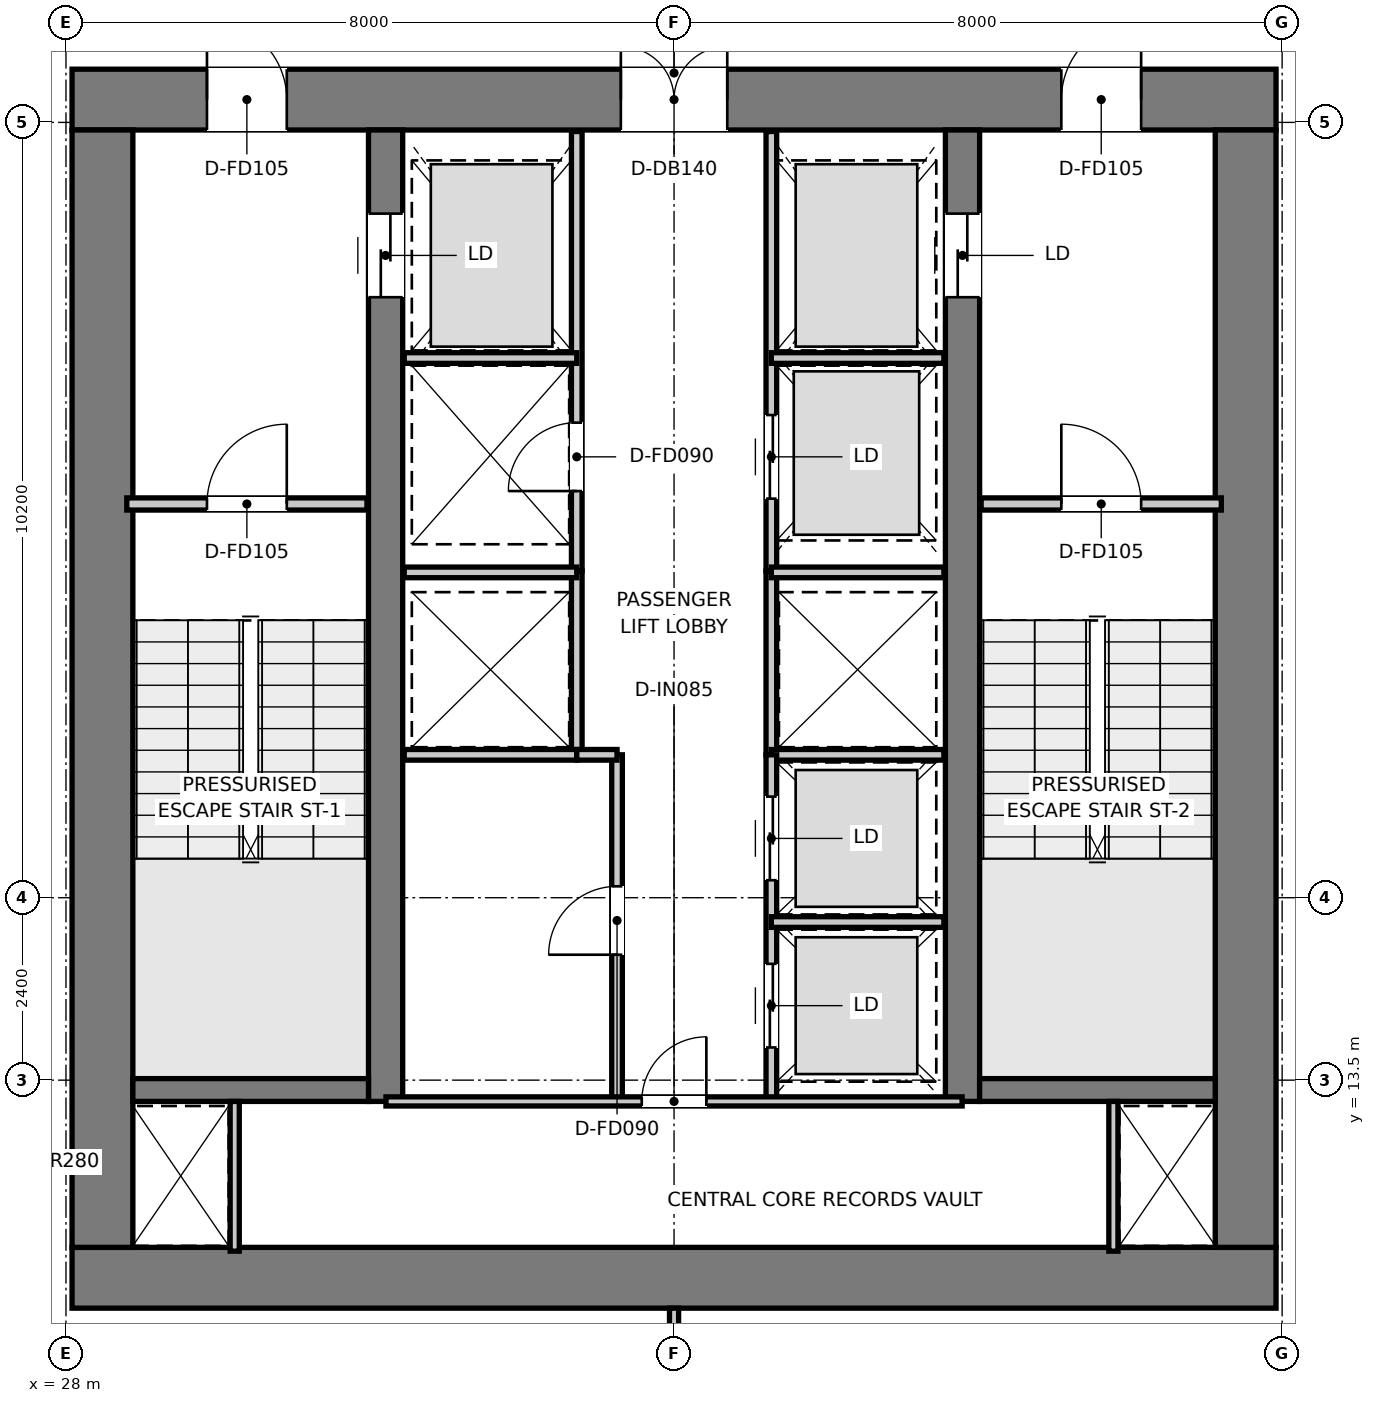
"""IFC4 building model, lengths in metres.
Left out: names, types, materials, properties, quantities, classifications, styles, units other than length and angle.
Written with IfcOpenShell. Run it as: python <this file> out.ifc"""

import sys

from ifc_helpers import new_model, si_unit, direction, frame, frame_2d, origin, place, context, subcontext, project, spatial, rectangle, extrude, element, fill, save


model = new_model("IFC4")
c1 = context("Model", 3, precision=1e-05, world=origin(), true_north=direction((0.0, 1.0)))
c2 = subcontext(c1, "Body", "Model", "MODEL_VIEW")
j1 = project(units=[si_unit("LENGTHUNIT", "METRE"), si_unit("PLANEANGLEUNIT", "RADIAN")], contexts=[c1])
p1 = place(None, origin())
s1 = spatial("IfcSite", under=j1, at=p1, CompositionType="ELEMENT")
p2 = place(p1, origin())
s2 = spatial("IfcBuilding", under=s1, at=p2, CompositionType="ELEMENT")
p3 = place(p2, frame((0.0, 0.0, 150.15)))
s3 = spatial("IfcBuildingStorey", under=s2, at=p3, CompositionType="ELEMENT", Elevation=150.15)
p4 = place(p3, frame((28.08, 10.9, 0.0), z_axis=(0.0, 0.0, 1.0), x_axis=(1.0, 0.0, 0.0)))
e1 = element("IfcWall", 1, at=p4, inside=s3, PredefinedType="SHEAR", context=c2, shape_type="SweptSolid", body=[
    extrude(rectangle(XDim=15.84, YDim=0.8, at=frame_2d((7.92, 0.0))), origin(), (0.0, 0.0, 1.0), 3.95),
])
p5 = place(p3, frame((28.08, 26.4, 0.0), z_axis=(0.0, 0.0, 1.0), x_axis=(1.0, 0.0, 0.0)))
e2 = element("IfcWall", 2, at=p5, inside=s3, PredefinedType="SHEAR", context=c2, shape_type="SweptSolid", body=[
    extrude(rectangle(XDim=15.84, YDim=0.8, at=frame_2d((7.92, 0.0))), origin(), (0.0, 0.0, 1.0), 3.95),
])
p6 = place(p5, frame((7.22, 0.0, 0.0)))
e3 = element("IfcOpeningElement", 3, at=p6, cuts=e2, PredefinedType="OPENING", context=c2, shape_type="SweptSolid", body=[
    extrude(rectangle(XDim=1.4, YDim=2.2, at=frame_2d((0.7, 1.1))), frame((0.0, 0.41, 0.0), z_axis=(0.0, -1.0, 0.0), x_axis=(1.0, 0.0, 0.0)), (0.0, 0.0, 1.0), 0.82),
])
p7 = place(p5, frame((1.775, 0.0, 0.0)))
e4 = element("IfcOpeningElement", 4, at=p7, cuts=e2, PredefinedType="OPENING", context=c2, shape_type="SweptSolid", body=[
    extrude(rectangle(XDim=1.05, YDim=2.1, at=frame_2d((0.525, 1.05))), frame((0.0, 0.41, 0.0), z_axis=(0.0, -1.0, 0.0), x_axis=(1.0, 0.0, 0.0)), (0.0, 0.0, 1.0), 0.82),
])
p8 = place(p5, frame((13.015, 0.0, 0.0)))
e5 = element("IfcOpeningElement", 5, at=p8, cuts=e2, PredefinedType="OPENING", context=c2, shape_type="SweptSolid", body=[
    extrude(rectangle(XDim=1.05, YDim=2.1, at=frame_2d((0.525, 1.05))), frame((0.0, 0.41, 0.0), z_axis=(0.0, -1.0, 0.0), x_axis=(1.0, 0.0, 0.0)), (0.0, 0.0, 1.0), 0.82),
])
for number, where, z_axis, x_axis in (
    (6, (28.48, 11.3, 0.0), (0.0, 0.0, 1.0), (0.0, 1.0, 0.0)),
    (7, (43.52, 11.3, 0.0), (0.0, 0.0, 1.0), (0.0, 1.0, 0.0)),
):
    element("IfcWall", number, at=place(p3, frame(where, z_axis=z_axis, x_axis=x_axis)), inside=s3, PredefinedType="SHEAR", context=c2, shape_type="SweptSolid", body=[
        extrude(rectangle(XDim=14.7, YDim=0.8, at=frame_2d((7.35, 0.0))), origin(), (0.0, 0.0, 1.0), 3.95),
    ])
p9 = place(p3, frame((32.205, 13.22, 0.0), z_axis=(0.0, 0.0, 1.0), x_axis=(0.0, 1.0, 0.0)))
e8 = element("IfcWall", 8, at=p9, inside=s3, PredefinedType="SHEAR", context=c2, shape_type="SweptSolid", body=[
    extrude(rectangle(XDim=12.78, YDim=0.45, at=frame_2d((6.39, 0.0))), origin(), (0.0, 0.0, 1.0), 3.95),
])
p10 = place(p9, frame((10.58, 0.0, 0.0)))
e9 = element("IfcOpeningElement", 9, at=p10, cuts=e8, PredefinedType="OPENING", context=c2, shape_type="SweptSolid", body=[
    extrude(rectangle(XDim=1.1, YDim=2.15, at=frame_2d((0.55, 1.075))), frame((0.0, 0.235, 0.0), z_axis=(0.0, -1.0, 0.0), x_axis=(1.0, 0.0, 0.0)), (0.0, 0.0, 1.0), 0.47),
])
p11 = place(p3, frame((39.795, 13.22, 0.0), z_axis=(0.0, 0.0, 1.0), x_axis=(0.0, 1.0, 0.0)))
e10 = element("IfcWall", 10, at=p11, inside=s3, PredefinedType="SHEAR", context=c2, shape_type="SweptSolid", body=[
    extrude(rectangle(XDim=12.78, YDim=0.45, at=frame_2d((6.39, 0.0))), origin(), (0.0, 0.0, 1.0), 3.95),
])
p12 = place(p11, frame((10.58, 0.0, 0.0)))
e11 = element("IfcOpeningElement", 11, at=p12, cuts=e10, PredefinedType="OPENING", context=c2, shape_type="SweptSolid", body=[
    extrude(rectangle(XDim=1.1, YDim=2.15, at=frame_2d((0.55, 1.075))), frame((0.0, 0.235, 0.0), z_axis=(0.0, -1.0, 0.0), x_axis=(1.0, 0.0, 0.0)), (0.0, 0.0, 1.0), 0.47),
])
for number, where, z_axis, x_axis in (
    (12, (28.88, 13.37, 0.0), (0.0, 0.0, 1.0), (1.0, 0.0, 0.0)),
    (13, (40.02, 13.37, 0.0), (0.0, 0.0, 1.0), (1.0, 0.0, 0.0)),
):
    element("IfcWall", number, at=place(p3, frame(where, z_axis=z_axis, x_axis=x_axis)), inside=s3, PredefinedType="SHEAR", context=c2, shape_type="SweptSolid", body=[
        extrude(rectangle(XDim=3.1, YDim=0.3, at=frame_2d((1.55, 0.0))), origin(), (0.0, 0.0, 1.0), 3.95),
    ])
p13 = place(p3, frame((28.8, 21.08, 0.0), z_axis=(0.0, 0.0, 1.0), x_axis=(1.0, 0.0, 0.0)))
e14 = element("IfcWall", 14, at=p13, inside=s3, PredefinedType="PARTITIONING", context=c2, shape_type="SweptSolid", body=[
    extrude(rectangle(XDim=3.16, YDim=0.16, at=frame_2d((1.58, 0.0))), origin(), (0.0, 0.0, 1.0), 3.67),
])
p14 = place(p13, frame((1.055, 0.0, 0.0)))
e15 = element("IfcOpeningElement", 15, at=p14, cuts=e14, PredefinedType="OPENING", context=c2, shape_type="SweptSolid", body=[
    extrude(rectangle(XDim=1.05, YDim=2.1, at=frame_2d((0.525, 1.05))), frame((0.0, 0.09, 0.0), z_axis=(0.0, -1.0, 0.0), x_axis=(1.0, 0.0, 0.0)), (0.0, 0.0, 1.0), 0.18),
])
p15 = place(p3, frame((40.04, 21.08, 0.0), z_axis=(0.0, 0.0, 1.0), x_axis=(1.0, 0.0, 0.0)))
e16 = element("IfcWall", 16, at=p15, inside=s3, PredefinedType="PARTITIONING", context=c2, shape_type="SweptSolid", body=[
    extrude(rectangle(XDim=3.16, YDim=0.16, at=frame_2d((1.58, 0.0))), origin(), (0.0, 0.0, 1.0), 3.67),
])
p16 = place(p15, frame((1.055, 0.0, 0.0)))
e17 = element("IfcOpeningElement", 17, at=p16, cuts=e16, PredefinedType="OPENING", context=c2, shape_type="SweptSolid", body=[
    extrude(rectangle(XDim=1.05, YDim=2.1, at=frame_2d((0.525, 1.05))), frame((0.0, 0.09, 0.0), z_axis=(0.0, -1.0, 0.0), x_axis=(1.0, 0.0, 0.0)), (0.0, 0.0, 1.0), 0.18),
])
p17 = place(p3, frame((34.72, 20.2, 0.0), z_axis=(0.0, 0.0, 1.0), x_axis=(0.0, 1.0, 0.0)))
e18 = element("IfcWall", 18, at=p17, inside=s3, PredefinedType="PARTITIONING", context=c2, shape_type="SweptSolid", body=[
    extrude(rectangle(XDim=5.78, YDim=0.14, at=frame_2d((2.89, 0.0))), origin(), (0.0, 0.0, 1.0), 2.67),
])
p18 = place(p17, frame((1.05, 0.0, 0.0)))
e19 = element("IfcOpeningElement", 19, at=p18, cuts=e18, PredefinedType="OPENING", context=c2, shape_type="SweptSolid", body=[
    extrude(rectangle(XDim=0.9, YDim=2.1, at=frame_2d((0.45, 1.05))), frame((0.0, 0.08, 0.0), z_axis=(0.0, -1.0, 0.0), x_axis=(1.0, 0.0, 0.0)), (0.0, 0.0, 1.0), 0.16),
])
p19 = place(p3, frame((37.28, 20.2, 0.0), z_axis=(0.0, 0.0, 1.0), x_axis=(0.0, 1.0, 0.0)))
e20 = element("IfcWall", 20, at=p19, inside=s3, PredefinedType="PARTITIONING", context=c2, shape_type="SweptSolid", body=[
    extrude(rectangle(XDim=5.78, YDim=0.14, at=frame_2d((2.89, 0.0))), origin(), (0.0, 0.0, 1.0), 2.67),
])
p20 = place(p19, frame((0.95, 0.0, 0.0)))
e21 = element("IfcOpeningElement", 21, at=p20, cuts=e20, PredefinedType="OPENING", context=c2, shape_type="SweptSolid", body=[
    extrude(rectangle(XDim=1.1, YDim=2.15, at=frame_2d((0.55, 1.075))), frame((0.0, 0.08, 0.0), z_axis=(0.0, -1.0, 0.0), x_axis=(1.0, 0.0, 0.0)), (0.0, 0.0, 1.0), 0.16),
])
for number, where, z_axis, x_axis in (
    (22, (32.45, 23.0, 0.0), (0.0, 0.0, 1.0), (1.0, 0.0, 0.0)),
    (23, (37.28, 23.0, 0.0), (0.0, 0.0, 1.0), (1.0, 0.0, 0.0)),
):
    element("IfcWall", number, at=place(p3, frame(where, z_axis=z_axis, x_axis=x_axis)), inside=s3, PredefinedType="PARTITIONING", context=c2, shape_type="SweptSolid", body=[
        extrude(rectangle(XDim=2.27, YDim=0.14, at=frame_2d((1.135, 0.0))), origin(), (0.0, 0.0, 1.0), 2.67),
    ])
for number, where, z_axis, x_axis in (
    (24, (34.72, 17.78, 0.0), (0.0, 0.0, 1.0), (0.0, 1.0, 0.0)),
    (25, (37.28, 17.78, 0.0), (0.0, 0.0, 1.0), (0.0, 1.0, 0.0)),
):
    element("IfcWall", number, at=place(p3, frame(where, z_axis=z_axis, x_axis=x_axis)), inside=s3, PredefinedType="PARTITIONING", context=c2, shape_type="SweptSolid", body=[
        extrude(rectangle(XDim=2.42, YDim=0.14, at=frame_2d((1.21, 0.0))), origin(), (0.0, 0.0, 1.0), 3.67),
    ])
for number, where, z_axis, x_axis in (
    (26, (32.45, 17.78, 0.0), (0.0, 0.0, 1.0), (1.0, 0.0, 0.0)),
    (27, (32.45, 20.18, 0.0), (0.0, 0.0, 1.0), (1.0, 0.0, 0.0)),
    (28, (37.28, 17.78, 0.0), (0.0, 0.0, 1.0), (1.0, 0.0, 0.0)),
    (29, (37.28, 20.18, 0.0), (0.0, 0.0, 1.0), (1.0, 0.0, 0.0)),
):
    element("IfcWall", number, at=place(p3, frame(where, z_axis=z_axis, x_axis=x_axis)), inside=s3, PredefinedType="PARTITIONING", context=c2, shape_type="SweptSolid", body=[
        extrude(rectangle(XDim=2.27, YDim=0.14, at=frame_2d((1.135, 0.0))), origin(), (0.0, 0.0, 1.0), 3.67),
    ])
p21 = place(p3, frame((35.25, 13.22, 0.0), z_axis=(0.0, 0.0, 1.0), x_axis=(0.0, 1.0, 0.0)))
e30 = element("IfcWall", 30, at=p21, inside=s3, PredefinedType="PARTITIONING", context=c2, shape_type="SweptSolid", body=[
    extrude(rectangle(XDim=4.56, YDim=0.14, at=frame_2d((2.28, 0.0))), origin(), (0.0, 0.0, 1.0), 3.67),
])
p22 = place(p21, frame((1.93, 0.0, 0.0)))
e31 = element("IfcOpeningElement", 31, at=p22, cuts=e30, PredefinedType="OPENING", context=c2, shape_type="SweptSolid", body=[
    extrude(rectangle(XDim=0.9, YDim=2.1, at=frame_2d((0.45, 1.05))), frame((0.0, 0.08, 0.0), z_axis=(0.0, -1.0, 0.0), x_axis=(1.0, 0.0, 0.0)), (0.0, 0.0, 1.0), 0.16),
])
p23 = place(p3, frame((34.72, 17.78, 0.0), z_axis=(0.0, 0.0, 1.0), x_axis=(1.0, 0.0, 0.0)))
e32 = element("IfcWall", 32, at=p23, inside=s3, PredefinedType="PARTITIONING", context=c2, shape_type="SweptSolid", body=[
    extrude(rectangle(XDim=0.53, YDim=0.14, at=frame_2d((0.265, 0.0))), origin(), (0.0, 0.0, 1.0), 3.67),
])
p24 = place(p3, frame((37.28, 13.22, 0.0), z_axis=(0.0, 0.0, 1.0), x_axis=(0.0, 1.0, 0.0)))
e33 = element("IfcWall", 33, at=p24, inside=s3, PredefinedType="PARTITIONING", context=c2, shape_type="SweptSolid", body=[
    extrude(rectangle(XDim=4.56, YDim=0.14, at=frame_2d((2.28, 0.0))), origin(), (0.0, 0.0, 1.0), 3.67),
])
p25 = place(p24, frame((0.71, 0.0, 0.0)))
e34 = element("IfcOpeningElement", 34, at=p25, cuts=e33, PredefinedType="OPENING", context=c2, shape_type="SweptSolid", body=[
    extrude(rectangle(XDim=1.1, YDim=2.15, at=frame_2d((0.55, 1.075))), frame((0.0, 0.08, 0.0), z_axis=(0.0, -1.0, 0.0), x_axis=(1.0, 0.0, 0.0)), (0.0, 0.0, 1.0), 0.16),
])
p26 = place(p24, frame((2.91, 0.0, 0.0)))
e35 = element("IfcOpeningElement", 35, at=p26, cuts=e33, PredefinedType="OPENING", context=c2, shape_type="SweptSolid", body=[
    extrude(rectangle(XDim=1.1, YDim=2.15, at=frame_2d((0.55, 1.075))), frame((0.0, 0.08, 0.0), z_axis=(0.0, -1.0, 0.0), x_axis=(1.0, 0.0, 0.0)), (0.0, 0.0, 1.0), 0.16),
])
p27 = place(p3, frame((37.28, 15.58, 0.0), z_axis=(0.0, 0.0, 1.0), x_axis=(1.0, 0.0, 0.0)))
e36 = element("IfcWall", 36, at=p27, inside=s3, PredefinedType="PARTITIONING", context=c2, shape_type="SweptSolid", body=[
    extrude(rectangle(XDim=2.27, YDim=0.14, at=frame_2d((1.135, 0.0))), origin(), (0.0, 0.0, 1.0), 3.67),
])
for number, where, z_axis, x_axis in (
    (37, (30.22, 11.25, 0.0), (0.0, 0.0, 1.0), (0.0, 1.0, 0.0)),
    (38, (41.78, 11.25, 0.0), (0.0, 0.0, 1.0), (0.0, 1.0, 0.0)),
):
    element("IfcWall", number, at=place(p3, frame(where, z_axis=z_axis, x_axis=x_axis)), inside=s3, PredefinedType="PARTITIONING", context=c2, shape_type="SweptSolid", body=[
        extrude(rectangle(XDim=1.97, YDim=0.12, at=frame_2d((0.985, 0.0))), origin(), (0.0, 0.0, 1.0), 3.67),
    ])
p28 = place(p3, frame((32.21, 13.22, 0.0), z_axis=(0.0, 0.0, 1.0), x_axis=(1.0, 0.0, 0.0)))
e39 = element("IfcWall", 39, at=p28, inside=s3, PredefinedType="PARTITIONING", context=c2, shape_type="SweptSolid", body=[
    extrude(rectangle(XDim=7.58, YDim=0.12, at=frame_2d((3.79, 0.0))), origin(), (0.0, 0.0, 1.0), 3.67),
])
p29 = place(p28, frame((3.365, 0.0, 0.0)))
e40 = element("IfcOpeningElement", 40, at=p29, cuts=e39, PredefinedType="OPENING", context=c2, shape_type="SweptSolid", body=[
    extrude(rectangle(XDim=0.85, YDim=2.1, at=frame_2d((0.425, 1.05))), frame((0.0, 0.07, 0.0), z_axis=(0.0, -1.0, 0.0), x_axis=(1.0, 0.0, 0.0)), (0.0, 0.0, 1.0), 0.14),
])
p30 = place(p3, frame((36.0, 2.084, 0.0), z_axis=(0.0, 0.0, 1.0), x_axis=(0.0, 1.0, 0.0)))
e41 = element("IfcWall", 41, at=p30, inside=s3, PredefinedType="PARTITIONING", context=c2, shape_type="SweptSolid", body=[
    extrude(rectangle(XDim=8.416, YDim=0.12, at=frame_2d((4.208, 0.0))), origin(), (0.0, 0.0, 1.0), 3.67),
])
p31 = place(p14, origin())
e42 = element("IfcDoor", 42, at=p31, inside=s3, OperationType="SINGLE_SWING_RIGHT", PredefinedType="DOOR", context=c2, shape_type="SweptSolid", body=[
    extrude(rectangle(XDim=1.05, YDim=2.1, at=frame_2d((0.525, 1.05))), frame((0.0, 0.025, 0.0), z_axis=(0.0, -1.0, 0.0), x_axis=(1.0, 0.0, 0.0)), (0.0, 0.0, 1.0), 0.05),
])
fill(e15, e42)
p32 = place(p16, origin())
e43 = element("IfcDoor", 43, at=p32, inside=s3, OperationType="SINGLE_SWING_LEFT", PredefinedType="DOOR", context=c2, shape_type="SweptSolid", body=[
    extrude(rectangle(XDim=1.05, YDim=2.1, at=frame_2d((0.525, 1.05))), frame((0.0, 0.025, 0.0), z_axis=(0.0, -1.0, 0.0), x_axis=(1.0, 0.0, 0.0)), (0.0, 0.0, 1.0), 0.05),
])
fill(e17, e43)
p33 = place(p6, origin())
e44 = element("IfcDoor", 44, at=p33, inside=s3, OperationType="DOUBLE_DOOR_SINGLE_SWING", PredefinedType="DOOR", context=c2, shape_type="SweptSolid", body=[
    extrude(rectangle(XDim=1.4, YDim=2.2, at=frame_2d((0.7, 1.1))), frame((0.0, 0.025, 0.0), z_axis=(0.0, -1.0, 0.0), x_axis=(1.0, 0.0, 0.0)), (0.0, 0.0, 1.0), 0.05),
])
fill(e3, e44)
p34 = place(p7, origin())
e45 = element("IfcDoor", 45, at=p34, inside=s3, OperationType="SINGLE_SWING_LEFT", PredefinedType="DOOR", context=c2, shape_type="SweptSolid", body=[
    extrude(rectangle(XDim=1.05, YDim=2.1, at=frame_2d((0.525, 1.05))), frame((0.0, 0.025, 0.0), z_axis=(0.0, -1.0, 0.0), x_axis=(1.0, 0.0, 0.0)), (0.0, 0.0, 1.0), 0.05),
])
fill(e4, e45)
p35 = place(p8, origin())
e46 = element("IfcDoor", 46, at=p35, inside=s3, OperationType="SINGLE_SWING_RIGHT", PredefinedType="DOOR", context=c2, shape_type="SweptSolid", body=[
    extrude(rectangle(XDim=1.05, YDim=2.1, at=frame_2d((0.525, 1.05))), frame((0.0, 0.025, 0.0), z_axis=(0.0, -1.0, 0.0), x_axis=(1.0, 0.0, 0.0)), (0.0, 0.0, 1.0), 0.05),
])
fill(e5, e46)
p36 = place(p10, origin())
e47 = element("IfcDoor", 47, at=p36, inside=s3, OperationType="DOUBLE_DOOR_SLIDING", PredefinedType="DOOR", context=c2, shape_type="SweptSolid", body=[
    extrude(rectangle(XDim=1.1, YDim=2.15, at=frame_2d((0.55, 1.075))), frame((0.0, 0.025, 0.0), z_axis=(0.0, -1.0, 0.0), x_axis=(1.0, 0.0, 0.0)), (0.0, 0.0, 1.0), 0.05),
])
fill(e9, e47)
p37 = place(p12, origin())
e48 = element("IfcDoor", 48, at=p37, inside=s3, OperationType="DOUBLE_DOOR_SLIDING", PredefinedType="DOOR", context=c2, shape_type="SweptSolid", body=[
    extrude(rectangle(XDim=1.1, YDim=2.15, at=frame_2d((0.55, 1.075))), frame((0.0, 0.025, 0.0), z_axis=(0.0, -1.0, 0.0), x_axis=(1.0, 0.0, 0.0)), (0.0, 0.0, 1.0), 0.05),
])
fill(e11, e48)
p38 = place(p18, origin())
e49 = element("IfcDoor", 49, at=p38, inside=s3, OperationType="SINGLE_SWING_LEFT", PredefinedType="DOOR", context=c2, shape_type="SweptSolid", body=[
    extrude(rectangle(XDim=0.9, YDim=2.1, at=frame_2d((0.45, 1.05))), frame((0.0, 0.025, 0.0), z_axis=(0.0, -1.0, 0.0), x_axis=(1.0, 0.0, 0.0)), (0.0, 0.0, 1.0), 0.05),
])
fill(e19, e49)
p39 = place(p20, origin())
e50 = element("IfcDoor", 50, at=p39, inside=s3, OperationType="DOUBLE_DOOR_SLIDING", PredefinedType="DOOR", context=c2, shape_type="SweptSolid", body=[
    extrude(rectangle(XDim=1.1, YDim=2.15, at=frame_2d((0.55, 1.075))), frame((0.0, 0.025, 0.0), z_axis=(0.0, -1.0, 0.0), x_axis=(1.0, 0.0, 0.0)), (0.0, 0.0, 1.0), 0.05),
])
fill(e21, e50)
p40 = place(p22, origin())
e51 = element("IfcDoor", 51, at=p40, inside=s3, OperationType="SINGLE_SWING_LEFT", PredefinedType="DOOR", context=c2, shape_type="SweptSolid", body=[
    extrude(rectangle(XDim=0.9, YDim=2.1, at=frame_2d((0.45, 1.05))), frame((0.0, 0.025, 0.0), z_axis=(0.0, -1.0, 0.0), x_axis=(1.0, 0.0, 0.0)), (0.0, 0.0, 1.0), 0.05),
])
fill(e31, e51)
p41 = place(p25, origin())
e52 = element("IfcDoor", 52, at=p41, inside=s3, OperationType="DOUBLE_DOOR_SLIDING", PredefinedType="DOOR", context=c2, shape_type="SweptSolid", body=[
    extrude(rectangle(XDim=1.1, YDim=2.15, at=frame_2d((0.55, 1.075))), frame((0.0, 0.025, 0.0), z_axis=(0.0, -1.0, 0.0), x_axis=(1.0, 0.0, 0.0)), (0.0, 0.0, 1.0), 0.05),
])
fill(e34, e52)
p42 = place(p26, origin())
e53 = element("IfcDoor", 53, at=p42, inside=s3, OperationType="DOUBLE_DOOR_SLIDING", PredefinedType="DOOR", context=c2, shape_type="SweptSolid", body=[
    extrude(rectangle(XDim=1.1, YDim=2.15, at=frame_2d((0.55, 1.075))), frame((0.0, 0.025, 0.0), z_axis=(0.0, -1.0, 0.0), x_axis=(1.0, 0.0, 0.0)), (0.0, 0.0, 1.0), 0.05),
])
fill(e35, e53)
p43 = place(p29, origin())
e54 = element("IfcDoor", 54, at=p43, inside=s3, OperationType="SINGLE_SWING_RIGHT", PredefinedType="DOOR", context=c2, shape_type="SweptSolid", body=[
    extrude(rectangle(XDim=0.85, YDim=2.1, at=frame_2d((0.425, 1.05))), frame((0.0, 0.025, 0.0), z_axis=(0.0, -1.0, 0.0), x_axis=(1.0, 0.0, 0.0)), (0.0, 0.0, 1.0), 0.05),
])
fill(e40, e54)
save(model, sys.argv[1])
